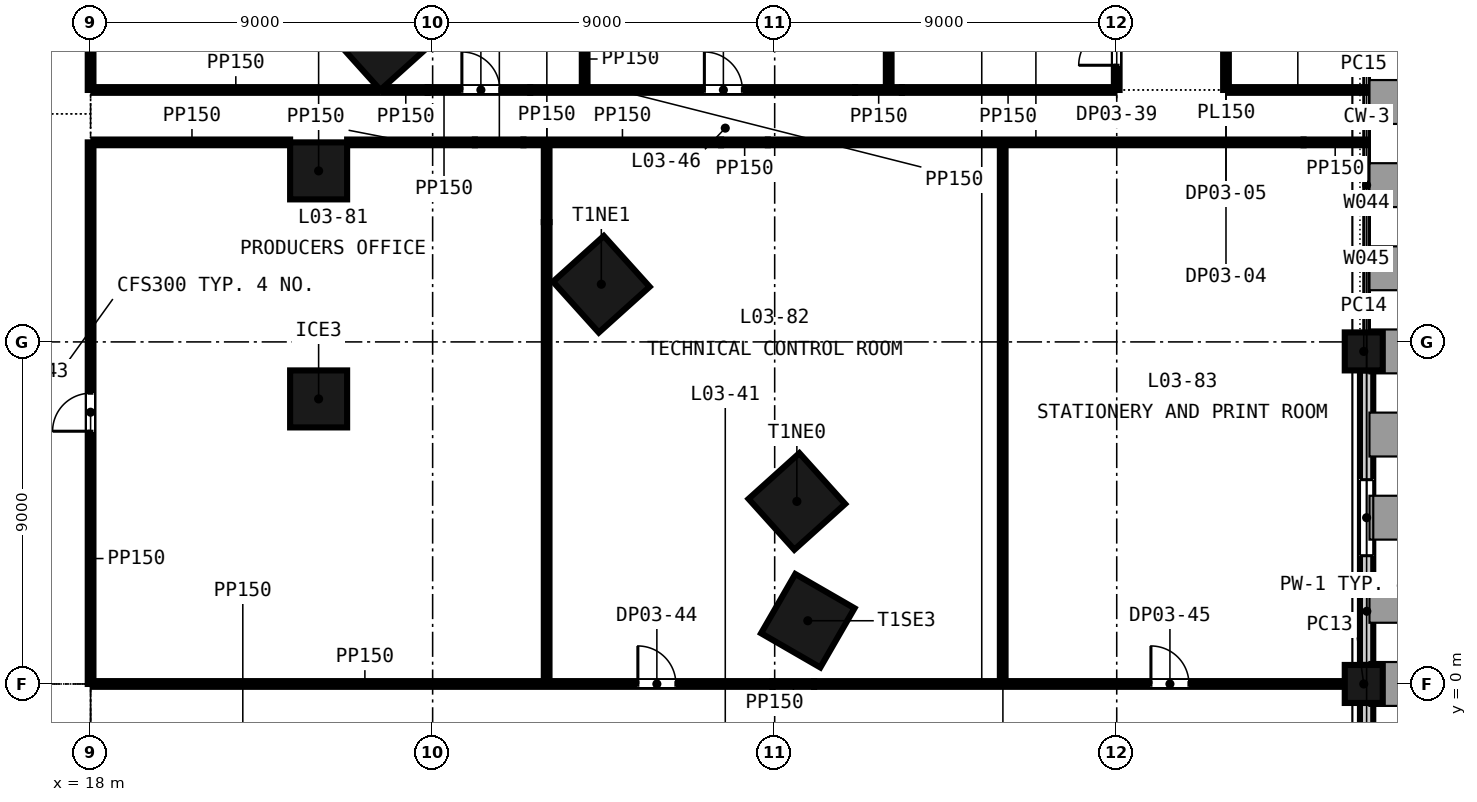
"""IFC4 building model, lengths in metres.
Left out: names, types, materials, properties, quantities, classifications, styles, units other than length and angle.
Written with IfcOpenShell. Run it as: python <this file> out.ifc"""

import sys

from ifc_helpers import new_model, si_unit, direction, frame, frame_2d, origin, origin_2d, place, context, subcontext, project, spatial, rectangle, extrude, element, fill, save


model = new_model("IFC4")
c1 = context("Model", 3, precision=1e-05, world=origin(), true_north=direction((0.0, 1.0)))
c2 = subcontext(c1, "Body", "Model", "MODEL_VIEW")
j1 = project(units=[si_unit("LENGTHUNIT", "METRE"), si_unit("PLANEANGLEUNIT", "RADIAN")], contexts=[c1])
p1 = place(None, origin())
s1 = spatial("IfcSite", under=j1, at=p1, CompositionType="ELEMENT")
p2 = place(p1, origin())
s2 = spatial("IfcBuilding", under=s1, at=p2, CompositionType="ELEMENT")
p3 = place(p2, frame((0.0, 0.0, 22.5)))
s3 = spatial("IfcBuildingStorey", under=s2, at=p3, CompositionType="ELEMENT", Elevation=22.5)
for number, where, z_axis, x_axis in (
    (1, (36.872, 1.663, -0.3), (0.0, 0.0, 1.0), (0.5, 0.866, 0.0)),
    (2, (36.584, 4.803, -0.3), (0.0, 0.0, 1.0), (-0.669, 0.743, 0.0)),
    (3, (31.438, 10.517, -0.3), (0.0, 0.0, 1.0), (-0.669, 0.743, 0.0)),
    (4, (25.691, 16.9, -0.3), (0.0, 0.0, 1.0), (-0.669, 0.743, 0.0)),
):
    element("IfcColumn", number, at=place(p3, frame(where, z_axis=z_axis, x_axis=x_axis)), inside=s3, PredefinedType="COLUMN", context=c2, shape_type="SweptSolid", body=[
        extrude(rectangle(XDim=1.8, YDim=1.8, at=origin_2d()), origin(), (0.0, 0.0, 1.0), 4.5),
    ])
for number, where, z_axis, x_axis in (
    (5, (24.0, 7.5, -0.3), (0.0, 0.0, 1.0), (1.0, 0.0, 0.0)),
    (6, (24.0, 13.5, -0.3), (0.0, 0.0, 1.0), (1.0, 0.0, 0.0)),
):
    element("IfcColumn", number, at=place(p3, frame(where, z_axis=z_axis, x_axis=x_axis)), inside=s3, PredefinedType="COLUMN", context=c2, shape_type="SweptSolid", body=[
        extrude(rectangle(XDim=1.5, YDim=1.5, at=origin_2d()), origin(), (0.0, 0.0, 1.0), 4.5),
    ])
for number, where, z_axis, x_axis in (
    (7, (51.5, 0.0, -0.3), (0.0, 0.0, 1.0), (0.0, 1.0, 0.0)),
    (8, (51.5, 8.75, -0.3), (0.0, 0.0, 1.0), (0.0, 1.0, 0.0)),
):
    element("IfcColumn", number, at=place(p3, frame(where, z_axis=z_axis, x_axis=x_axis)), inside=s3, PredefinedType="COLUMN", context=c2, shape_type="SweptSolid", body=[
        extrude(rectangle(XDim=1.0, YDim=1.0, at=origin_2d()), origin(), (0.0, 0.0, 1.0), 4.5),
    ])
p4 = place(p3, frame((51.575, -8.2, -0.3), z_axis=(0.0, 0.0, 1.0), x_axis=(0.0, 1.0, 0.0)))
e9 = element("IfcWall", 9, at=p4, inside=s3, PredefinedType="SOLIDWALL", context=c2, shape_type="SweptSolid", body=[
    extrude(rectangle(XDim=7.7, YDim=0.35, at=frame_2d((3.85, 0.0))), origin(), (0.0, 0.0, 1.0), 3.6),
])
p5 = place(p4, frame((2.85, 0.0, 1.2)))
e10 = element("IfcOpeningElement", 10, at=p5, cuts=e9, PredefinedType="OPENING", context=c2, shape_type="SweptSolid", body=[
    extrude(rectangle(XDim=2.0, YDim=2.35, at=frame_2d((1.0, 1.175))), frame((0.0, 0.185, 0.0), z_axis=(0.0, -1.0, 0.0), x_axis=(1.0, 0.0, 0.0)), (0.0, 0.0, 1.0), 0.37),
])
p6 = place(p3, frame((51.575, 0.5, -0.3), z_axis=(0.0, 0.0, 1.0), x_axis=(0.0, 1.0, 0.0)))
e11 = element("IfcWall", 11, at=p6, inside=s3, PredefinedType="SOLIDWALL", context=c2, shape_type="SweptSolid", body=[
    extrude(rectangle(XDim=7.75, YDim=0.35, at=frame_2d((3.875, 0.0))), origin(), (0.0, 0.0, 1.0), 3.6),
])
p7 = place(p6, frame((2.875, 0.0, 1.2)))
e12 = element("IfcOpeningElement", 12, at=p7, cuts=e11, PredefinedType="OPENING", context=c2, shape_type="SweptSolid", body=[
    extrude(rectangle(XDim=2.0, YDim=2.35, at=frame_2d((1.0, 1.175))), frame((0.0, 0.185, 0.0), z_axis=(0.0, -1.0, 0.0), x_axis=(1.0, 0.0, 0.0)), (0.0, 0.0, 1.0), 0.37),
])
p8 = place(p3, frame((18.075, 0.0, 0.0), z_axis=(0.0, 0.0, 1.0), x_axis=(1.0, 0.0, 0.0)))
e13 = element("IfcWall", 13, at=p8, inside=s3, PredefinedType="PARTITIONING", context=c2, shape_type="SweptSolid", body=[
    extrude(rectangle(XDim=17.865, YDim=0.15, at=frame_2d((8.933, 0.0))), origin(), (0.0, 0.0, 1.0), 4.2),
])
p9 = place(p8, frame((14.325, 0.0, 0.0)))
e14 = element("IfcOpeningElement", 14, at=p9, cuts=e13, PredefinedType="OPENING", context=c2, shape_type="SweptSolid", body=[
    extrude(rectangle(XDim=1.0, YDim=2.1, at=frame_2d((0.5, 1.05))), frame((0.0, 0.085, 0.0), z_axis=(0.0, -1.0, 0.0), x_axis=(1.0, 0.0, 0.0)), (0.0, 0.0, 1.0), 0.17),
])
p10 = place(p3, frame((35.94, 0.0, 0.0), z_axis=(0.0, 0.0, 1.0), x_axis=(1.0, 0.0, 0.0)))
e15 = element("IfcWall", 15, at=p10, inside=s3, PredefinedType="PARTITIONING", context=c2, shape_type="SweptSolid", body=[
    extrude(rectangle(XDim=1.097, YDim=0.15, at=frame_2d((0.548, 0.0))), origin(), (0.0, 0.0, 1.0), 3.2),
])
p11 = place(p3, frame((37.037, 0.0, 0.0), z_axis=(0.0, 0.0, 1.0), x_axis=(1.0, 0.0, 0.0)))
e16 = element("IfcWall", 16, at=p11, inside=s3, PredefinedType="PARTITIONING", context=c2, shape_type="SweptSolid", body=[
    extrude(rectangle(XDim=13.963, YDim=0.15, at=frame_2d((6.981, 0.0))), origin(), (0.0, 0.0, 1.0), 4.2),
])
p12 = place(p11, frame((8.863, 0.0, 0.0)))
e17 = element("IfcOpeningElement", 17, at=p12, cuts=e16, PredefinedType="OPENING", context=c2, shape_type="SweptSolid", body=[
    extrude(rectangle(XDim=1.0, YDim=2.1, at=frame_2d((0.5, 1.05))), frame((0.0, 0.085, 0.0), z_axis=(0.0, -1.0, 0.0), x_axis=(1.0, 0.0, 0.0)), (0.0, 0.0, 1.0), 0.17),
])
p13 = place(p3, frame((18.075, 14.25, 0.0), z_axis=(0.0, 0.0, 1.0), x_axis=(1.0, 0.0, 0.0)))
e18 = element("IfcWall", 18, at=p13, inside=s3, PredefinedType="PARTITIONING", context=c2, shape_type="SweptSolid", body=[
    extrude(rectangle(XDim=5.175, YDim=0.15, at=frame_2d((2.587, 0.0))), origin(), (0.0, 0.0, 1.0), 4.2),
])
p14 = place(p3, frame((24.75, 14.25, 0.0), z_axis=(0.0, 0.0, 1.0), x_axis=(1.0, 0.0, 0.0)))
e19 = element("IfcWall", 19, at=p14, inside=s3, PredefinedType="PARTITIONING", context=c2, shape_type="SweptSolid", body=[
    extrude(rectangle(XDim=3.361, YDim=0.15, at=frame_2d((1.681, 0.0))), origin(), (0.0, 0.0, 1.0), 4.2),
])
p15 = place(p3, frame((28.111, 14.25, 0.0), z_axis=(0.0, 0.0, 1.0), x_axis=(1.0, 0.0, 0.0)))
e20 = element("IfcWall", 20, at=p15, inside=s3, PredefinedType="PARTITIONING", context=c2, shape_type="SweptSolid", body=[
    extrude(rectangle(XDim=1.278, YDim=0.15, at=frame_2d((0.639, 0.0))), origin(), (0.0, 0.0, 1.0), 3.2),
])
p16 = place(p3, frame((29.389, 14.25, 0.0), z_axis=(0.0, 0.0, 1.0), x_axis=(1.0, 0.0, 0.0)))
e21 = element("IfcWall", 21, at=p16, inside=s3, PredefinedType="PARTITIONING", context=c2, shape_type="SweptSolid", body=[
    extrude(rectangle(XDim=5.2, YDim=0.15, at=frame_2d((2.6, 0.0))), origin(), (0.0, 0.0, 1.0), 4.2),
])
p17 = place(p3, frame((34.589, 14.25, 0.0), z_axis=(0.0, 0.0, 1.0), x_axis=(1.0, 0.0, 0.0)))
e22 = element("IfcWall", 22, at=p17, inside=s3, PredefinedType="PARTITIONING", context=c2, shape_type="SweptSolid", body=[
    extrude(rectangle(XDim=1.231, YDim=0.15, at=frame_2d((0.616, 0.0))), origin(), (0.0, 0.0, 1.0), 3.219),
])
p18 = place(p3, frame((35.82, 14.25, 0.0), z_axis=(0.0, 0.0, 1.0), x_axis=(1.0, 0.0, 0.0)))
e23 = element("IfcWall", 23, at=p18, inside=s3, PredefinedType="PARTITIONING", context=c2, shape_type="SweptSolid", body=[
    extrude(rectangle(XDim=14.096, YDim=0.15, at=frame_2d((7.048, 0.0))), origin(), (0.0, 0.0, 1.0), 4.2),
])
p19 = place(p3, frame((49.916, 14.25, 0.0), z_axis=(0.0, 0.0, 1.0), x_axis=(1.0, 0.0, 0.0)))
e24 = element("IfcWall", 24, at=p19, inside=s3, PredefinedType="PARTITIONING", context=c2, shape_type="SweptSolid", body=[
    extrude(rectangle(XDim=1.654, YDim=0.15, at=frame_2d((0.827, 0.0))), origin(), (0.0, 0.0, 1.0), 3.298),
])
p20 = place(p3, frame((18.075, 15.629, 0.0), z_axis=(0.0, 0.0, 1.0), x_axis=(1.0, 0.0, 0.0)))
e25 = element("IfcWall", 25, at=p20, inside=s3, PredefinedType="PARTITIONING", context=c2, shape_type="SweptSolid", body=[
    extrude(rectangle(XDim=7.482, YDim=0.15, at=frame_2d((3.741, 0.0))), origin(), (0.0, 0.0, 1.0), 4.2),
])
p21 = place(p3, frame((25.708, 15.629, 0.0), z_axis=(0.0, 0.0, 1.0), x_axis=(1.0, 0.0, 0.0)))
e26 = element("IfcWall", 26, at=p21, inside=s3, PredefinedType="PARTITIONING", context=c2, shape_type="SweptSolid", body=[
    extrude(rectangle(XDim=1.162, YDim=0.15, at=frame_2d((0.581, 0.0))), origin(), (0.0, 0.0, 1.0), 4.2),
])
p22 = place(p3, frame((26.869, 15.629, 0.0), z_axis=(0.0, 0.0, 1.0), x_axis=(1.0, 0.0, 0.0)))
e27 = element("IfcWall", 27, at=p22, inside=s3, PredefinedType="PARTITIONING", context=c2, shape_type="SweptSolid", body=[
    extrude(rectangle(XDim=2.698, YDim=0.15, at=frame_2d((1.349, 0.0))), origin(), (0.0, 0.0, 1.0), 3.111),
])
p23 = place(p22, frame((0.9, 0.0, 0.0)))
e28 = element("IfcOpeningElement", 28, at=p23, cuts=e27, PredefinedType="OPENING", context=c2, shape_type="SweptSolid", body=[
    extrude(rectangle(XDim=1.0, YDim=2.1, at=frame_2d((0.5, 1.05))), frame((0.0, 0.085, 0.0), z_axis=(0.0, -1.0, 0.0), x_axis=(1.0, 0.0, 0.0)), (0.0, 0.0, 1.0), 0.17),
])
p24 = place(p3, frame((29.567, 15.629, 0.0), z_axis=(0.0, 0.0, 1.0), x_axis=(1.0, 0.0, 0.0)))
e29 = element("IfcWall", 29, at=p24, inside=s3, PredefinedType="PARTITIONING", context=c2, shape_type="SweptSolid", body=[
    extrude(rectangle(XDim=8.548, YDim=0.15, at=frame_2d((4.274, 0.0))), origin(), (0.0, 0.0, 1.0), 4.2),
])
p25 = place(p24, frame((4.583, 0.0, 0.0)))
e30 = element("IfcOpeningElement", 30, at=p25, cuts=e29, PredefinedType="OPENING", context=c2, shape_type="SweptSolid", body=[
    extrude(rectangle(XDim=1.0, YDim=2.1, at=frame_2d((0.5, 1.05))), frame((0.0, 0.085, 0.0), z_axis=(0.0, -1.0, 0.0), x_axis=(1.0, 0.0, 0.0)), (0.0, 0.0, 1.0), 0.17),
])
p26 = place(p3, frame((38.116, 15.629, 0.0), z_axis=(0.0, 0.0, 1.0), x_axis=(1.0, 0.0, 0.0)))
e31 = element("IfcWall", 31, at=p26, inside=s3, PredefinedType="PARTITIONING", context=c2, shape_type="SweptSolid", body=[
    extrude(rectangle(XDim=1.231, YDim=0.15, at=frame_2d((0.616, 0.0))), origin(), (0.0, 0.0, 1.0), 3.219),
])
p27 = place(p3, frame((39.347, 15.629, 0.0), z_axis=(0.0, 0.0, 1.0), x_axis=(1.0, 0.0, 0.0)))
e32 = element("IfcWall", 32, at=p27, inside=s3, PredefinedType="PARTITIONING", context=c2, shape_type="SweptSolid", body=[
    extrude(rectangle(XDim=5.578, YDim=0.15, at=frame_2d((2.789, 0.0))), origin(), (0.0, 0.0, 1.0), 4.2),
])
p28 = place(p3, frame((47.95, 15.629, 0.0), z_axis=(0.0, 0.0, 1.0), x_axis=(1.0, 0.0, 0.0)))
e33 = element("IfcWall", 33, at=p28, inside=s3, PredefinedType="PARTITIONING", context=c2, shape_type="SweptSolid", body=[
    extrude(rectangle(XDim=3.62, YDim=0.15, at=frame_2d((1.81, 0.0))), origin(), (0.0, 0.0, 1.0), 4.2),
])
p29 = place(p3, frame((18.0, 0.0, 0.0), z_axis=(0.0, 0.0, 1.0), x_axis=(0.0, 1.0, 0.0)))
e34 = element("IfcWall", 34, at=p29, inside=s3, PredefinedType="PARTITIONING", context=c2, shape_type="SweptSolid", body=[
    extrude(rectangle(XDim=14.25, YDim=0.15, at=frame_2d((7.125, 0.0))), origin(), (0.0, 0.0, 1.0), 4.2),
])
p30 = place(p29, frame((6.65, 0.0, 0.0)))
e35 = element("IfcOpeningElement", 35, at=p30, cuts=e34, PredefinedType="OPENING", context=c2, shape_type="SweptSolid", body=[
    extrude(rectangle(XDim=1.0, YDim=2.1, at=frame_2d((0.5, 1.05))), frame((0.0, 0.085, 0.0), z_axis=(0.0, -1.0, 0.0), x_axis=(1.0, 0.0, 0.0)), (0.0, 0.0, 1.0), 0.17),
])
p31 = place(p3, frame((18.0, 15.629, 0.0), z_axis=(0.0, 0.0, 1.0), x_axis=(0.0, 1.0, 0.0)))
e36 = element("IfcWall", 36, at=p31, inside=s3, PredefinedType="PARTITIONING", context=c2, shape_type="SweptSolid", body=[
    extrude(rectangle(XDim=9.85, YDim=0.15, at=frame_2d((4.925, 0.0))), origin(), (0.0, 0.0, 1.0), 4.2),
])
p32 = place(p3, frame((30.0, 0.075, 0.0), z_axis=(0.0, 0.0, 1.0), x_axis=(0.0, 1.0, 0.0)))
e37 = element("IfcWall", 37, at=p32, inside=s3, PredefinedType="PARTITIONING", context=c2, shape_type="SweptSolid", body=[
    extrude(rectangle(XDim=12.077, YDim=0.15, at=frame_2d((6.039, 0.0))), origin(), (0.0, 0.0, 1.0), 4.2),
])
p33 = place(p3, frame((30.0, 12.152, 0.0), z_axis=(0.0, 0.0, 1.0), x_axis=(0.0, 1.0, 0.0)))
e38 = element("IfcWall", 38, at=p33, inside=s3, PredefinedType="PARTITIONING", context=c2, shape_type="SweptSolid", body=[
    extrude(rectangle(XDim=2.023, YDim=0.15, at=frame_2d((1.011, 0.0))), origin(), (0.0, 0.0, 1.0), 3.2),
])
p34 = place(p3, frame((31.0, 15.704, 0.0), z_axis=(0.0, 0.0, 1.0), x_axis=(0.0, 1.0, 0.0)))
e39 = element("IfcWall", 39, at=p34, inside=s3, PredefinedType="PARTITIONING", context=c2, shape_type="SweptSolid", body=[
    extrude(rectangle(XDim=1.479, YDim=0.15, at=frame_2d((0.74, 0.0))), origin(), (0.0, 0.0, 1.0), 3.111),
])
p35 = place(p3, frame((39.0, 15.704, 0.0), z_axis=(0.0, 0.0, 1.0), x_axis=(0.0, 1.0, 0.0)))
e40 = element("IfcWall", 40, at=p35, inside=s3, PredefinedType="PARTITIONING", context=c2, shape_type="SweptSolid", body=[
    extrude(rectangle(XDim=4.636, YDim=0.15, at=frame_2d((2.318, 0.0))), origin(), (0.0, 0.0, 1.0), 4.2),
])
p36 = place(p3, frame((42.0, 0.075, 0.0), z_axis=(0.0, 0.0, 1.0), x_axis=(0.0, 1.0, 0.0)))
e41 = element("IfcWall", 41, at=p36, inside=s3, PredefinedType="PARTITIONING", context=c2, shape_type="SweptSolid", body=[
    extrude(rectangle(XDim=14.1, YDim=0.15, at=frame_2d((7.05, 0.0))), origin(), (0.0, 0.0, 1.0), 4.2),
])
p37 = place(p3, frame((45.0, 15.629, 0.0), z_axis=(0.0, 0.0, 1.0), x_axis=(0.0, 1.0, 0.0)))
e42 = element("IfcWall", 42, at=p37, inside=s3, PredefinedType="PARTITIONING", context=c2, shape_type="SweptSolid", body=[
    extrude(rectangle(XDim=7.829, YDim=0.15, at=frame_2d((3.915, 0.0))), origin(), (0.0, 0.0, 1.0), 4.2),
])
p38 = place(p37, frame((0.65, 0.0, 0.0)))
e43 = element("IfcOpeningElement", 43, at=p38, cuts=e42, PredefinedType="OPENING", context=c2, shape_type="SweptSolid", body=[
    extrude(rectangle(XDim=1.0, YDim=2.1, at=frame_2d((0.5, 1.05))), frame((0.0, 0.085, 0.0), z_axis=(0.0, -1.0, 0.0), x_axis=(1.0, 0.0, 0.0)), (0.0, 0.0, 1.0), 0.17),
])
p39 = place(p3, frame((47.875, 15.629, 0.0), z_axis=(0.0, 0.0, 1.0), x_axis=(0.0, 1.0, 0.0)))
e44 = element("IfcWall", 44, at=p39, inside=s3, PredefinedType="PARTITIONING", context=c2, shape_type="SweptSolid", body=[
    extrude(rectangle(XDim=9.323, YDim=0.15, at=frame_2d((4.661, 0.0))), origin(), (0.0, 0.0, 1.0), 4.2),
])
p40 = place(p39, frame((6.021, 0.0, 0.0)))
e45 = element("IfcOpeningElement", 45, at=p40, cuts=e44, PredefinedType="OPENING", context=c2, shape_type="SweptSolid", body=[
    extrude(rectangle(XDim=0.9, YDim=2.1, at=frame_2d((0.45, 1.05))), frame((0.0, 0.085, 0.0), z_axis=(0.0, -1.0, 0.0), x_axis=(1.0, 0.0, 0.0)), (0.0, 0.0, 1.0), 0.17),
])
p41 = place(p7, origin())
e46 = element("IfcWindow", 46, at=p41, inside=s3, PartitioningType="SINGLE_PANEL", PredefinedType="WINDOW", context=c2, shape_type="SweptSolid", body=[
    extrude(rectangle(XDim=2.0, YDim=2.35, at=frame_2d((1.0, 1.175))), frame((0.0, 0.03, 0.0), z_axis=(0.0, -1.0, 0.0), x_axis=(1.0, 0.0, 0.0)), (0.0, 0.0, 1.0), 0.06),
])
fill(e12, e46)
p42 = place(p23, origin())
e47 = element("IfcDoor", 47, at=p42, inside=s3, OperationType="SINGLE_SWING_LEFT", PredefinedType="DOOR", context=c2, shape_type="SweptSolid", body=[
    extrude(rectangle(XDim=1.0, YDim=2.1, at=frame_2d((0.5, 1.05))), frame((0.0, 0.025, 0.0), z_axis=(0.0, -1.0, 0.0), x_axis=(1.0, 0.0, 0.0)), (0.0, 0.0, 1.0), 0.05),
])
fill(e28, e47)
p43 = place(p25, origin())
e48 = element("IfcDoor", 48, at=p43, inside=s3, OperationType="SINGLE_SWING_LEFT", PredefinedType="DOOR", context=c2, shape_type="SweptSolid", body=[
    extrude(rectangle(XDim=1.0, YDim=2.1, at=frame_2d((0.5, 1.05))), frame((0.0, 0.025, 0.0), z_axis=(0.0, -1.0, 0.0), x_axis=(1.0, 0.0, 0.0)), (0.0, 0.0, 1.0), 0.05),
])
fill(e30, e48)
p44 = place(p38, origin())
e49 = element("IfcDoor", 49, at=p44, inside=s3, OperationType="SINGLE_SWING_LEFT", PredefinedType="DOOR", context=c2, shape_type="SweptSolid", body=[
    extrude(rectangle(XDim=1.0, YDim=2.1, at=frame_2d((0.5, 1.05))), frame((0.0, 0.025, 0.0), z_axis=(0.0, -1.0, 0.0), x_axis=(1.0, 0.0, 0.0)), (0.0, 0.0, 1.0), 0.05),
])
fill(e43, e49)
p45 = place(p30, origin())
e50 = element("IfcDoor", 50, at=p45, inside=s3, OperationType="SINGLE_SWING_LEFT", PredefinedType="DOOR", context=c2, shape_type="SweptSolid", body=[
    extrude(rectangle(XDim=1.0, YDim=2.1, at=frame_2d((0.5, 1.05))), frame((0.0, 0.025, 0.0), z_axis=(0.0, -1.0, 0.0), x_axis=(1.0, 0.0, 0.0)), (0.0, 0.0, 1.0), 0.05),
])
fill(e35, e50)
p46 = place(p9, origin())
e51 = element("IfcDoor", 51, at=p46, inside=s3, OperationType="SINGLE_SWING_LEFT", PredefinedType="DOOR", context=c2, shape_type="SweptSolid", body=[
    extrude(rectangle(XDim=1.0, YDim=2.1, at=frame_2d((0.5, 1.05))), frame((0.0, 0.025, 0.0), z_axis=(0.0, -1.0, 0.0), x_axis=(1.0, 0.0, 0.0)), (0.0, 0.0, 1.0), 0.05),
])
fill(e14, e51)
p47 = place(p12, origin())
e52 = element("IfcDoor", 52, at=p47, inside=s3, OperationType="SINGLE_SWING_LEFT", PredefinedType="DOOR", context=c2, shape_type="SweptSolid", body=[
    extrude(rectangle(XDim=1.0, YDim=2.1, at=frame_2d((0.5, 1.05))), frame((0.0, 0.025, 0.0), z_axis=(0.0, -1.0, 0.0), x_axis=(1.0, 0.0, 0.0)), (0.0, 0.0, 1.0), 0.05),
])
fill(e17, e52)
save(model, sys.argv[1])
